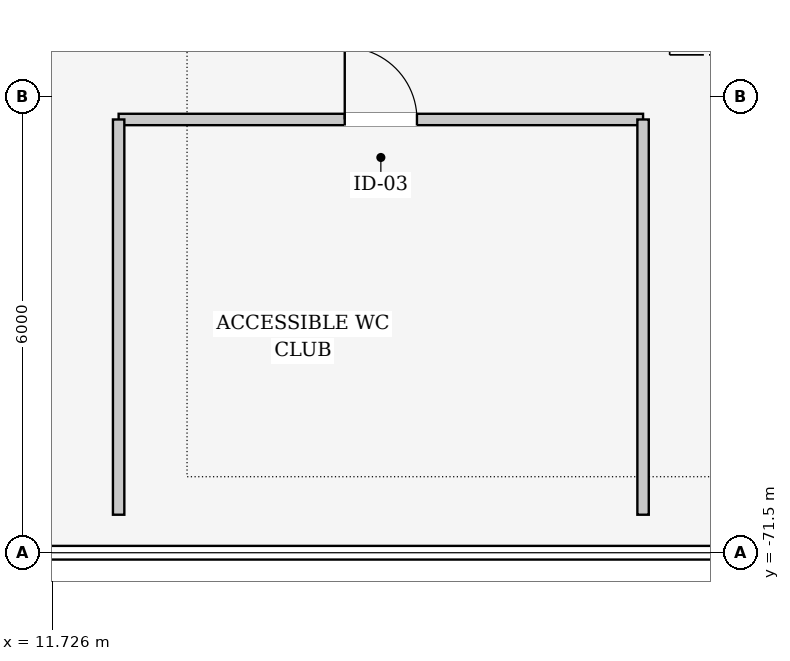
"""IFC4 building model, lengths in metres.
Left out: names, types, materials, properties, quantities, classifications, styles, units other than length and angle.
Written with IfcOpenShell. Run it as: python <this file> out.ifc"""

import sys

from ifc_helpers import new_model, si_unit, direction, frame, frame_2d, origin, place, context, subcontext, project, spatial, rectangle, extrude, element, fill, save


model = new_model("IFC4")
c1 = context("Model", 3, precision=1e-05, world=origin(), true_north=direction((0.0, 1.0)))
c2 = subcontext(c1, "Body", "Model", "MODEL_VIEW")
j1 = project(units=[si_unit("LENGTHUNIT", "METRE"), si_unit("PLANEANGLEUNIT", "RADIAN")], contexts=[c1])
p1 = place(None, origin())
s1 = spatial("IfcSite", under=j1, at=p1, CompositionType="ELEMENT")
p2 = place(p1, origin())
s2 = spatial("IfcBuilding", under=s1, at=p2, CompositionType="ELEMENT")
p3 = place(p2, frame((0.0, 0.0, 11.4)))
s3 = spatial("IfcBuildingStorey", under=s2, at=p3, CompositionType="ELEMENT", Elevation=11.4)
p4 = place(p3, frame((12.6, -65.8, 0.0), z_axis=(0.0, 0.0, 1.0), x_axis=(1.0, 0.0, 0.0)))
e1 = element("IfcWall", 1, at=p4, inside=s3, PredefinedType="PARTITIONING", context=c2, shape_type="SweptSolid", body=[
    extrude(rectangle(XDim=6.9, YDim=0.15, at=frame_2d((3.45, 0.0))), origin(), (0.0, 0.0, 1.0), 3.645),
])
p5 = place(p4, frame((2.975, 0.0, 0.0)))
e2 = element("IfcOpeningElement", 2, at=p5, cuts=e1, PredefinedType="OPENING", context=c2, shape_type="SweptSolid", body=[
    extrude(rectangle(XDim=0.95, YDim=2.15, at=frame_2d((0.475, 1.075))), frame((0.0, 0.085, 0.0), z_axis=(0.0, -1.0, 0.0), x_axis=(1.0, 0.0, 0.0)), (0.0, 0.0, 1.0), 0.17),
])
for number, where, z_axis, x_axis in (
    (3, (19.5, -65.8, 0.0), (0.0, 0.0, 1.0), (0.0, -1.0, 0.0)),
    (4, (12.6, -71.0, 0.0), (0.0, 0.0, 1.0), (0.0, 1.0, 0.0)),
):
    element("IfcWall", number, at=place(p3, frame(where, z_axis=z_axis, x_axis=x_axis)), inside=s3, PredefinedType="PARTITIONING", context=c2, shape_type="SweptSolid", body=[
        extrude(rectangle(XDim=5.2, YDim=0.15, at=frame_2d((2.6, 0.0))), origin(), (0.0, 0.0, 1.0), 3.645),
    ])
p6 = place(p5, origin())
e5 = element("IfcDoor", 5, at=p6, inside=s3, OperationType="SINGLE_SWING_LEFT", PredefinedType="DOOR", context=c2, shape_type="SweptSolid", body=[
    extrude(rectangle(XDim=0.95, YDim=2.15, at=frame_2d((0.475, 1.075))), frame((0.0, 0.025, 0.0), z_axis=(0.0, -1.0, 0.0), x_axis=(1.0, 0.0, 0.0)), (0.0, 0.0, 1.0), 0.05),
])
fill(e2, e5)
save(model, sys.argv[1])
